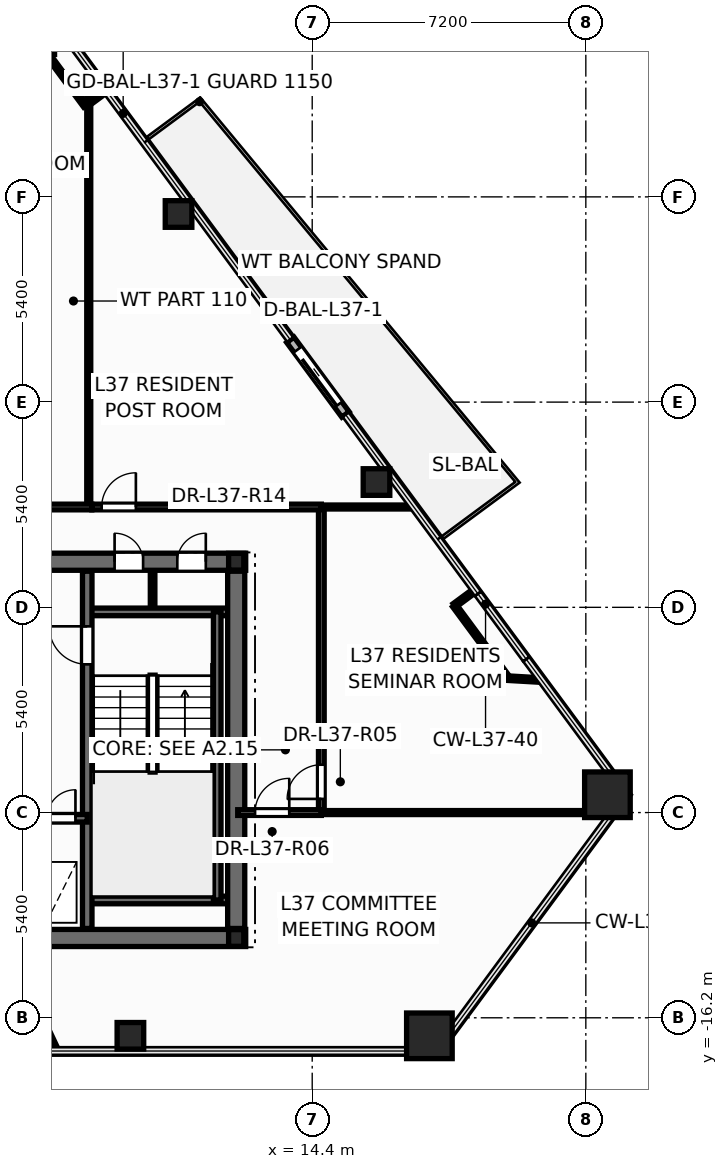
"""IFC4 building model, lengths in metres.
Left out: names, types, materials, properties, quantities, classifications, styles, units other than length and angle.
Written with IfcOpenShell. Run it as: python <this file> out.ifc"""

import sys

from ifc_helpers import new_model, si_unit, direction, frame, frame_2d, origin, origin_2d, place, context, subcontext, project, spatial, rectangle, hollow_rectangle, hollow_circle, i_section, extrude, element, fill, save


model = new_model("IFC4")
c1 = context("Model", 3, precision=1e-05, world=origin(), true_north=direction((0.0, 1.0)))
c2 = subcontext(c1, "Body", "Model", "MODEL_VIEW")
j1 = project(units=[si_unit("LENGTHUNIT", "METRE"), si_unit("PLANEANGLEUNIT", "RADIAN")], contexts=[c1])
p1 = place(None, origin())
s1 = spatial("IfcSite", under=j1, at=p1, CompositionType="ELEMENT")
p2 = place(p1, origin())
s2 = spatial("IfcBuilding", under=s1, at=p2, CompositionType="ELEMENT")
p3 = place(p2, frame((0.0, 0.0, 143.7)))
s3 = spatial("IfcBuildingStorey", under=s2, at=p3, CompositionType="ELEMENT", Elevation=143.7)
for number, where, z_axis, x_axis in (
    (1, (17.484, -16.674, 0.0), (0.0, 0.0, 1.0), (1.0, 0.0, 0.0)),
    (2, (22.168, -10.331, 0.0), (0.0, 0.0, 1.0), (1.0, 0.0, 0.0)),
):
    element("IfcColumn", number, at=place(p3, frame(where, z_axis=z_axis, x_axis=x_axis)), inside=s3, PredefinedType="COLUMN", context=c2, shape_type="SweptSolid", body=[
        extrude(hollow_rectangle(XDim=1.2, YDim=1.2, WallThickness=0.055, at=origin_2d()), origin(), (0.0, 0.0, 1.0), 3.6),
    ])
for number, where, z_axis, x_axis in (
    (3, (9.616, -16.674, 0.0), (0.0, 0.0, 1.0), (1.0, 0.0, 0.0)),
    (4, (16.092, -2.103, 0.0), (0.0, 0.0, 1.0), (1.0, 0.0, 0.0)),
    (5, (10.883, 4.95, 0.0), (0.0, 0.0, 1.0), (1.0, 0.0, 0.0)),
):
    element("IfcColumn", number, at=place(p3, frame(where, z_axis=z_axis, x_axis=x_axis)), inside=s3, PredefinedType="COLUMN", context=c2, shape_type="SweptSolid", body=[
        extrude(hollow_circle(Radius=0.35, WallThickness=0.03, at=origin_2d()), origin(), (0.0, 0.0, 1.0), 3.6),
    ])
for number, where, z_axis, x_axis in (
    (6, (12.4, -14.1, 0.0), (0.0, 0.0, 1.0), (1.0, 0.0, 0.0)),
    (7, (12.4, -4.2, 0.0), (0.0, 0.0, 1.0), (1.0, 0.0, 0.0)),
):
    element("IfcColumn", number, at=place(p3, frame(where, z_axis=z_axis, x_axis=x_axis)), inside=s3, PredefinedType="COLUMN", context=c2, shape_type="SweptSolid", body=[
        extrude(i_section(OverallWidth=0.4, OverallDepth=0.44, WebThickness=0.028, FlangeThickness=0.04, at=origin_2d()), origin(), (0.0, 0.0, 1.0), 3.6),
    ])
p4 = place(p3, frame((15.275, -0.324, -0.015), z_axis=(0.0, 0.0, 1.0), x_axis=(-0.594092829232, 0.804396488216, 0.0)))
e8 = element("IfcWall", 8, at=p4, inside=s3, PredefinedType="STANDARD", context=c2, shape_type="SweptSolid", body=[
    extrude(rectangle(XDim=2.44, YDim=0.24, at=frame_2d((1.22, 0.0))), origin(), (0.0, 0.0, 1.0), 2.807),
])
p5 = place(p4, frame((0.32, 0.0, 0.015)))
e9 = element("IfcOpeningElement", 9, at=p5, cuts=e8, PredefinedType="OPENING", context=c2, shape_type="SweptSolid", body=[
    extrude(rectangle(XDim=1.806, YDim=2.204, at=frame_2d((0.9, 1.102))), frame((0.0, 0.13, 0.0), z_axis=(0.0, -1.0, 0.0), x_axis=(1.0, 0.0, 0.0)), (0.0, 0.0, 1.0), 0.26),
])
p6 = place(p3, frame((10.2, -5.52, 0.0), z_axis=(0.0, 0.0, 1.0), x_axis=(0.0, 1.0, 0.0)))
e10 = element("IfcWall", 10, at=p6, inside=s3, PredefinedType="PARTITIONING", context=c2, shape_type="SweptSolid", body=[
    extrude(rectangle(XDim=1.12, YDim=0.12, at=frame_2d((0.56, 0.0))), origin(), (0.0, 0.0, 1.0), 3.35),
])
p7 = place(p3, frame((-12.65, -14.1, 0.0), z_axis=(0.0, 0.0, 1.0), x_axis=(1.0, 0.0, 0.0)))
e11 = element("IfcWall", 11, at=p7, inside=s3, PredefinedType="SHEAR", context=c2, shape_type="SweptSolid", body=[
    extrude(rectangle(XDim=25.3, YDim=0.45, at=frame_2d((12.65, 0.0))), origin(), (0.0, 0.0, 1.0), 3.6),
])
p8 = place(p3, frame((-12.65, -4.2, 0.0), z_axis=(0.0, 0.0, 1.0), x_axis=(1.0, 0.0, 0.0)))
e12 = element("IfcWall", 12, at=p8, inside=s3, PredefinedType="SHEAR", context=c2, shape_type="SweptSolid", body=[
    extrude(rectangle(XDim=25.3, YDim=0.45, at=frame_2d((12.65, 0.0))), origin(), (0.0, 0.0, 1.0), 3.6),
])
p9 = place(p8, frame((1.85, 0.0, 0.0)))
e13 = element("IfcOpeningElement", 13, at=p9, cuts=e12, PredefinedType="OPENING", context=c2, shape_type="SweptSolid", body=[
    extrude(rectangle(XDim=0.756, YDim=2.054, at=frame_2d((0.375, 1.027))), frame((0.0, 0.235, 0.0), z_axis=(0.0, -1.0, 0.0), x_axis=(1.0, 0.0, 0.0)), (0.0, 0.0, 1.0), 0.47),
])
p10 = place(p8, frame((21.85, 0.0, 0.0)))
e14 = element("IfcOpeningElement", 14, at=p10, cuts=e12, PredefinedType="OPENING", context=c2, shape_type="SweptSolid", body=[
    extrude(rectangle(XDim=0.756, YDim=2.054, at=frame_2d((0.375, 1.027))), frame((0.0, 0.235, 0.0), z_axis=(0.0, -1.0, 0.0), x_axis=(1.0, 0.0, 0.0)), (0.0, 0.0, 1.0), 0.47),
])
p11 = place(p8, frame((23.5, 0.0, 0.0)))
e15 = element("IfcOpeningElement", 15, at=p11, cuts=e12, PredefinedType="OPENING", context=c2, shape_type="SweptSolid", body=[
    extrude(rectangle(XDim=0.756, YDim=2.054, at=frame_2d((0.375, 1.027))), frame((0.0, 0.235, 0.0), z_axis=(0.0, -1.0, 0.0), x_axis=(1.0, 0.0, 0.0)), (0.0, 0.0, 1.0), 0.47),
])
p12 = place(p8, frame((5.85, 0.0, 0.0)))
e16 = element("IfcOpeningElement", 16, at=p12, cuts=e12, PredefinedType="OPENING", context=c2, shape_type="SweptSolid", body=[
    extrude(rectangle(XDim=1.006, YDim=2.104, at=frame_2d((0.5, 1.052))), frame((0.0, 0.235, 0.0), z_axis=(0.0, -1.0, 0.0), x_axis=(1.0, 0.0, 0.0)), (0.0, 0.0, 1.0), 0.47),
])
p13 = place(p8, frame((10.35, 0.0, 0.0)))
e17 = element("IfcOpeningElement", 17, at=p13, cuts=e12, PredefinedType="OPENING", context=c2, shape_type="SweptSolid", body=[
    extrude(rectangle(XDim=1.406, YDim=2.154, at=frame_2d((0.7, 1.077))), frame((0.0, 0.235, 0.0), z_axis=(0.0, -1.0, 0.0), x_axis=(1.0, 0.0, 0.0)), (0.0, 0.0, 1.0), 0.47),
])
p14 = place(p8, frame((18.45, 0.0, 0.0)))
e18 = element("IfcOpeningElement", 18, at=p14, cuts=e12, PredefinedType="OPENING", context=c2, shape_type="SweptSolid", body=[
    extrude(rectangle(XDim=1.006, YDim=2.104, at=frame_2d((0.5, 1.052))), frame((0.0, 0.235, 0.0), z_axis=(0.0, -1.0, 0.0), x_axis=(1.0, 0.0, 0.0)), (0.0, 0.0, 1.0), 0.47),
])
for number, where, z_axis, x_axis in (
    (19, (8.48, -5.52, 0.0), (0.0, 0.0, 1.0), (1.0, 0.0, 0.0)),
    (20, (8.48, -13.1, 0.0), (0.0, 0.0, 1.0), (1.0, 0.0, 0.0)),
):
    element("IfcWall", number, at=place(p3, frame(where, z_axis=z_axis, x_axis=x_axis)), inside=s3, PredefinedType="SOLIDWALL", context=c2, shape_type="SweptSolid", body=[
        extrude(rectangle(XDim=3.87, YDim=0.2, at=frame_2d((1.935, 0.0))), origin(), (0.0, 0.0, 1.0), 3.6),
    ])
p15 = place(p3, frame((11.9, -13.1, 0.0), z_axis=(0.0, 0.0, 1.0), x_axis=(0.0, 1.0, 0.0)))
e21 = element("IfcWall", 21, at=p15, inside=s3, PredefinedType="SOLIDWALL", context=c2, shape_type="SweptSolid", body=[
    extrude(rectangle(XDim=7.58, YDim=0.2, at=frame_2d((3.79, 0.0))), origin(), (0.0, 0.0, 1.0), 3.6),
])
p16 = place(p3, frame((8.48, -13.85, 0.0), z_axis=(0.0, 0.0, 1.0), x_axis=(0.0, 1.0, 0.0)))
e22 = element("IfcWall", 22, at=p16, inside=s3, PredefinedType="SHEAR", context=c2, shape_type="SweptSolid", body=[
    extrude(rectangle(XDim=9.4, YDim=0.25, at=frame_2d((4.7, 0.0))), origin(), (0.0, 0.0, 1.0), 3.6),
])
p17 = place(p16, frame((6.95, 0.0, 0.0)))
e23 = element("IfcOpeningElement", 23, at=p17, cuts=e22, PredefinedType="OPENING", context=c2, shape_type="SweptSolid", body=[
    extrude(rectangle(XDim=1.006, YDim=2.104, at=frame_2d((0.5, 1.052))), frame((0.0, 0.135, 0.0), z_axis=(0.0, -1.0, 0.0), x_axis=(1.0, 0.0, 0.0)), (0.0, 0.0, 1.0), 0.27),
])
p18 = place(p3, frame((5.12, -10.95, 0.0), z_axis=(0.0, 0.0, 1.0), x_axis=(1.0, 0.0, 0.0)))
e24 = element("IfcWall", 24, at=p18, inside=s3, PredefinedType="SOLIDWALL", context=c2, shape_type="SweptSolid", body=[
    extrude(rectangle(XDim=3.36, YDim=0.2, at=frame_2d((1.68, 0.0))), origin(), (0.0, 0.0, 1.0), 3.6),
])
p19 = place(p18, frame((0.42, 0.0, 0.0)))
e25 = element("IfcOpeningElement", 25, at=p19, cuts=e24, PredefinedType="OPENING", context=c2, shape_type="SweptSolid", body=[
    extrude(rectangle(XDim=1.106, YDim=2.104, at=frame_2d((0.55, 1.052))), frame((0.0, 0.11, 0.0), z_axis=(0.0, -1.0, 0.0), x_axis=(1.0, 0.0, 0.0)), (0.0, 0.0, 1.0), 0.22),
])
p20 = place(p18, frame((2.3, 0.0, 0.0)))
e26 = element("IfcOpeningElement", 26, at=p20, cuts=e24, PredefinedType="OPENING", context=c2, shape_type="SweptSolid", body=[
    extrude(rectangle(XDim=0.756, YDim=2.054, at=frame_2d((0.375, 1.027))), frame((0.0, 0.11, 0.0), z_axis=(0.0, -1.0, 0.0), x_axis=(1.0, 0.0, 0.0)), (0.0, 0.0, 1.0), 0.22),
])
p21 = place(p3, frame((12.4, -13.85, 0.0), z_axis=(0.0, 0.0, 1.0), x_axis=(0.0, 1.0, 0.0)))
e27 = element("IfcWall", 27, at=p21, inside=s3, PredefinedType="SHEAR", context=c2, shape_type="SweptSolid", body=[
    extrude(rectangle(XDim=9.4, YDim=0.45, at=frame_2d((4.7, 0.0))), origin(), (0.0, 0.0, 1.0), 3.6),
])
p22 = place(p3, frame((8.52, -2.76, 0.0), z_axis=(0.0, 0.0, 1.0), x_axis=(0.0, 1.0, 0.0)))
e28 = element("IfcWall", 28, at=p22, inside=s3, PredefinedType="PARTITIONING", context=c2, shape_type="SweptSolid", body=[
    extrude(rectangle(XDim=10.84, YDim=0.105, at=frame_2d((5.42, 0.0))), origin(), (0.0, 0.0, 1.0), 2.617),
])
p23 = place(p3, frame((14.64, -10.8, 0.0), z_axis=(0.0, 0.0, 1.0), x_axis=(0.0, 1.0, 0.0)))
e29 = element("IfcWall", 29, at=p23, inside=s3, PredefinedType="PARTITIONING", context=c2, shape_type="SweptSolid", body=[
    extrude(rectangle(XDim=8.04, YDim=0.15, at=frame_2d((4.02, 0.0))), origin(), (0.0, 0.0, 1.0), 2.325),
])
p24 = place(p23, frame((0.359, 0.0, 0.0)))
e30 = element("IfcOpeningElement", 30, at=p24, cuts=e29, PredefinedType="OPENING", context=c2, shape_type="SweptSolid", body=[
    extrude(rectangle(XDim=0.906, YDim=2.104, at=frame_2d((0.45, 1.052))), frame((0.0, 0.085, 0.0), z_axis=(0.0, -1.0, 0.0), x_axis=(1.0, 0.0, 0.0)), (0.0, 0.0, 1.0), 0.17),
])
p25 = place(p3, frame((14.64, -10.8, 0.0), z_axis=(0.0, 0.0, 1.0), x_axis=(1.0, 0.0, 0.0)))
e31 = element("IfcWall", 31, at=p25, inside=s3, PredefinedType="PARTITIONING", context=c2, shape_type="SweptSolid", body=[
    extrude(rectangle(XDim=7.679, YDim=0.105, at=frame_2d((3.84, 0.0))), origin(), (0.0, 0.0, 1.0), 2.792),
])
p26 = place(p3, frame((2.36, -2.76, 0.0), z_axis=(0.0, 0.0, 1.0), x_axis=(1.0, 0.0, 0.0)))
e32 = element("IfcWall", 32, at=p26, inside=s3, PredefinedType="PARTITIONING", context=c2, shape_type="SweptSolid", body=[
    extrude(rectangle(XDim=6.24, YDim=0.15, at=frame_2d((3.12, 0.0))), origin(), (0.0, 0.0, 1.0), 2.325),
])
p27 = place(p3, frame((8.602, -2.76, 0.0), z_axis=(0.0, 0.0, 1.0), x_axis=(1.0, 0.0, 0.0)))
e33 = element("IfcWall", 33, at=p27, inside=s3, PredefinedType="PARTITIONING", context=c2, shape_type="SweptSolid", body=[
    extrude(rectangle(XDim=6.038, YDim=0.15, at=frame_2d((3.019, 0.0))), origin(), (0.0, 0.0, 1.0), 3.35),
])
p28 = place(p27, frame((0.258, 0.0, 0.0)))
e34 = element("IfcOpeningElement", 34, at=p28, cuts=e33, PredefinedType="OPENING", context=c2, shape_type="SweptSolid", body=[
    extrude(rectangle(XDim=0.906, YDim=2.104, at=frame_2d((0.45, 1.052))), frame((0.0, 0.085, 0.0), z_axis=(0.0, -1.0, 0.0), x_axis=(1.0, 0.0, 0.0)), (0.0, 0.0, 1.0), 0.17),
])
p29 = place(p3, frame((2.36, 9.2, 0.0), z_axis=(0.0, 0.0, 1.0), x_axis=(1.0, 0.0, 0.0)))
e35 = element("IfcWall", 35, at=p29, inside=s3, PredefinedType="PARTITIONING", context=c2, shape_type="SweptSolid", body=[
    extrude(rectangle(XDim=5.26, YDim=0.105, at=frame_2d((2.63, 0.0))), origin(), (0.0, 0.0, 1.0), 2.617),
])
p30 = place(p3, frame((14.64, -2.76, 0.0), z_axis=(0.0, 0.0, 1.0), x_axis=(1.0, 0.0, 0.0)))
e36 = element("IfcWall", 36, at=p30, inside=s3, PredefinedType="PARTITIONING", context=c2, shape_type="SweptSolid", body=[
    extrude(rectangle(XDim=2.434, YDim=0.105, at=frame_2d((1.217, 0.0))), origin(), (0.0, 0.0, 1.0), 2.792),
])
p31 = place(p3, frame((8.432, 7.798, 0.0), z_axis=(0.0, 0.0, 1.0), x_axis=(-0.594168747529, 0.804340412674, 0.0)))
e37 = element("IfcWall", 37, at=p31, inside=s3, PredefinedType="PARTITIONING", context=c2, shape_type="SweptSolid", body=[
    extrude(rectangle(XDim=2.378, YDim=0.12, at=frame_2d((1.189, 0.0))), origin(), (0.0, 0.0, 1.0), 3.35),
])
p32 = place(p3, frame((12.44, -10.8, 0.0), z_axis=(0.0, 0.0, 1.0), x_axis=(1.0, 0.0, 0.0)))
e38 = element("IfcWall", 38, at=p32, inside=s3, PredefinedType="PARTITIONING", context=c2, shape_type="SweptSolid", body=[
    extrude(rectangle(XDim=2.2, YDim=0.15, at=frame_2d((1.1, 0.0))), origin(), (0.0, 0.0, 1.0), 2.792),
])
p33 = place(p32, frame((0.456, 0.0, 0.0)))
e39 = element("IfcOpeningElement", 39, at=p33, cuts=e38, PredefinedType="OPENING", context=c2, shape_type="SweptSolid", body=[
    extrude(rectangle(XDim=0.906, YDim=2.104, at=frame_2d((0.45, 1.052))), frame((0.0, 0.085, 0.0), z_axis=(0.0, -1.0, 0.0), x_axis=(1.0, 0.0, 0.0)), (0.0, 0.0, 1.0), 0.17),
])
p34 = place(p3, frame((19.555, -7.264, 0.0), z_axis=(0.0, 0.0, 1.0), x_axis=(-0.594168747529, 0.804340412674, 0.0)))
e40 = element("IfcWall", 40, at=p34, inside=s3, PredefinedType="PARTITIONING", context=c2, shape_type="SweptSolid", body=[
    extrude(rectangle(XDim=2.378, YDim=0.12, at=frame_2d((1.189, 0.0))), origin(), (0.0, 0.0, 1.0), 3.35),
])
p35 = place(p3, frame((20.425, -7.314, 0.0), z_axis=(0.0, 0.0, 1.0), x_axis=(-0.998331873932, 0.057736206072, 0.0)))
e41 = element("IfcWall", 41, at=p35, inside=s3, PredefinedType="PARTITIONING", context=c2, shape_type="SweptSolid", body=[
    extrude(rectangle(XDim=0.871, YDim=0.12, at=frame_2d((0.436, 0.0))), origin(), (0.0, 0.0, 1.0), 2.792),
])
p36 = place(p3, frame((7.353, -16.394, 0.0), z_axis=(0.0, 0.0, 1.0), x_axis=(0.425860530217, -0.904788820004, 0.0)))
e42 = element("IfcWall", 42, at=p36, inside=s3, PredefinedType="PARTITIONING", context=c2, shape_type="SweptSolid", body=[
    extrude(rectangle(XDim=0.741, YDim=0.12, at=frame_2d((0.37, 0.0))), origin(), (0.0, 0.0, 1.0), 2.792),
])
for number, where, z_axis, x_axis in (
    (43, (18.142, -5.351, 0.0), (0.0, 0.0, 1.0), (0.804, 0.594, 0.0)),
    (44, (8.971, 8.196, 0.0), (0.0, 0.0, 1.0), (-0.804, -0.594, 0.0)),
):
    element("IfcWall", number, at=place(p3, frame(where, z_axis=z_axis, x_axis=x_axis)), inside=s3, PredefinedType="PARTITIONING", context=c2, shape_type="SweptSolid", body=[
        extrude(rectangle(XDim=0.67, YDim=0.12, at=frame_2d((0.335, 0.0))), origin(), (0.0, 0.0, 1.0), 2.792),
    ])
p37 = place(p5, origin())
e45 = element("IfcDoor", 45, at=p37, inside=s3, OperationType="SLIDING_TO_LEFT", PredefinedType="DOOR", context=c2, shape_type="SweptSolid", body=[
    extrude(rectangle(XDim=1.8, YDim=2.2, at=frame_2d((0.9, 1.1))), frame((0.0, 0.025, 0.0), z_axis=(0.0, -1.0, 0.0), x_axis=(1.0, 0.0, 0.0)), (0.0, 0.0, 1.0), 0.05),
])
fill(e9, e45)
p38 = place(p17, origin())
e46 = element("IfcDoor", 46, at=p38, inside=s3, OperationType="SINGLE_SWING_RIGHT", PredefinedType="DOOR", context=c2, shape_type="SweptSolid", body=[
    extrude(rectangle(XDim=1.0, YDim=2.1, at=frame_2d((0.5, 1.05))), frame((0.0, 0.025, 0.0), z_axis=(0.0, -1.0, 0.0), x_axis=(1.0, 0.0, 0.0)), (0.0, 0.0, 1.0), 0.05),
])
fill(e23, e46)
p39 = place(p20, origin())
e47 = element("IfcDoor", 47, at=p39, inside=s3, OperationType="SINGLE_SWING_RIGHT", PredefinedType="DOOR", context=c2, shape_type="SweptSolid", body=[
    extrude(rectangle(XDim=0.75, YDim=2.05, at=frame_2d((0.375, 1.025))), frame((0.0, 0.025, 0.0), z_axis=(0.0, -1.0, 0.0), x_axis=(1.0, 0.0, 0.0)), (0.0, 0.0, 1.0), 0.05),
])
fill(e26, e47)
p40 = place(p10, origin())
e48 = element("IfcDoor", 48, at=p40, inside=s3, OperationType="SINGLE_SWING_LEFT", PredefinedType="DOOR", context=c2, shape_type="SweptSolid", body=[
    extrude(rectangle(XDim=0.75, YDim=2.05, at=frame_2d((0.375, 1.025))), frame((0.0, 0.025, 0.0), z_axis=(0.0, -1.0, 0.0), x_axis=(1.0, 0.0, 0.0)), (0.0, 0.0, 1.0), 0.05),
])
fill(e14, e48)
p41 = place(p11, origin())
e49 = element("IfcDoor", 49, at=p41, inside=s3, OperationType="SINGLE_SWING_RIGHT", PredefinedType="DOOR", context=c2, shape_type="SweptSolid", body=[
    extrude(rectangle(XDim=0.75, YDim=2.05, at=frame_2d((0.375, 1.025))), frame((0.0, 0.025, 0.0), z_axis=(0.0, -1.0, 0.0), x_axis=(1.0, 0.0, 0.0)), (0.0, 0.0, 1.0), 0.05),
])
fill(e15, e49)
p42 = place(p24, origin())
e50 = element("IfcDoor", 50, at=p42, inside=s3, OperationType="SINGLE_SWING_LEFT", PredefinedType="DOOR", context=c2, shape_type="SweptSolid", body=[
    extrude(rectangle(XDim=0.9, YDim=2.1, at=frame_2d((0.45, 1.05))), frame((0.0, 0.025, 0.0), z_axis=(0.0, -1.0, 0.0), x_axis=(1.0, 0.0, 0.0)), (0.0, 0.0, 1.0), 0.05),
])
fill(e30, e50)
p43 = place(p33, origin())
e51 = element("IfcDoor", 51, at=p43, inside=s3, OperationType="SINGLE_SWING_RIGHT", PredefinedType="DOOR", context=c2, shape_type="SweptSolid", body=[
    extrude(rectangle(XDim=0.9, YDim=2.1, at=frame_2d((0.45, 1.05))), frame((0.0, 0.025, 0.0), z_axis=(0.0, -1.0, 0.0), x_axis=(1.0, 0.0, 0.0)), (0.0, 0.0, 1.0), 0.05),
])
fill(e39, e51)
p44 = place(p28, origin())
e52 = element("IfcDoor", 52, at=p44, inside=s3, OperationType="SINGLE_SWING_RIGHT", PredefinedType="DOOR", context=c2, shape_type="SweptSolid", body=[
    extrude(rectangle(XDim=0.9, YDim=2.1, at=frame_2d((0.45, 1.05))), frame((0.0, 0.025, 0.0), z_axis=(0.0, -1.0, 0.0), x_axis=(1.0, 0.0, 0.0)), (0.0, 0.0, 1.0), 0.05),
])
fill(e34, e52)
save(model, sys.argv[1])
